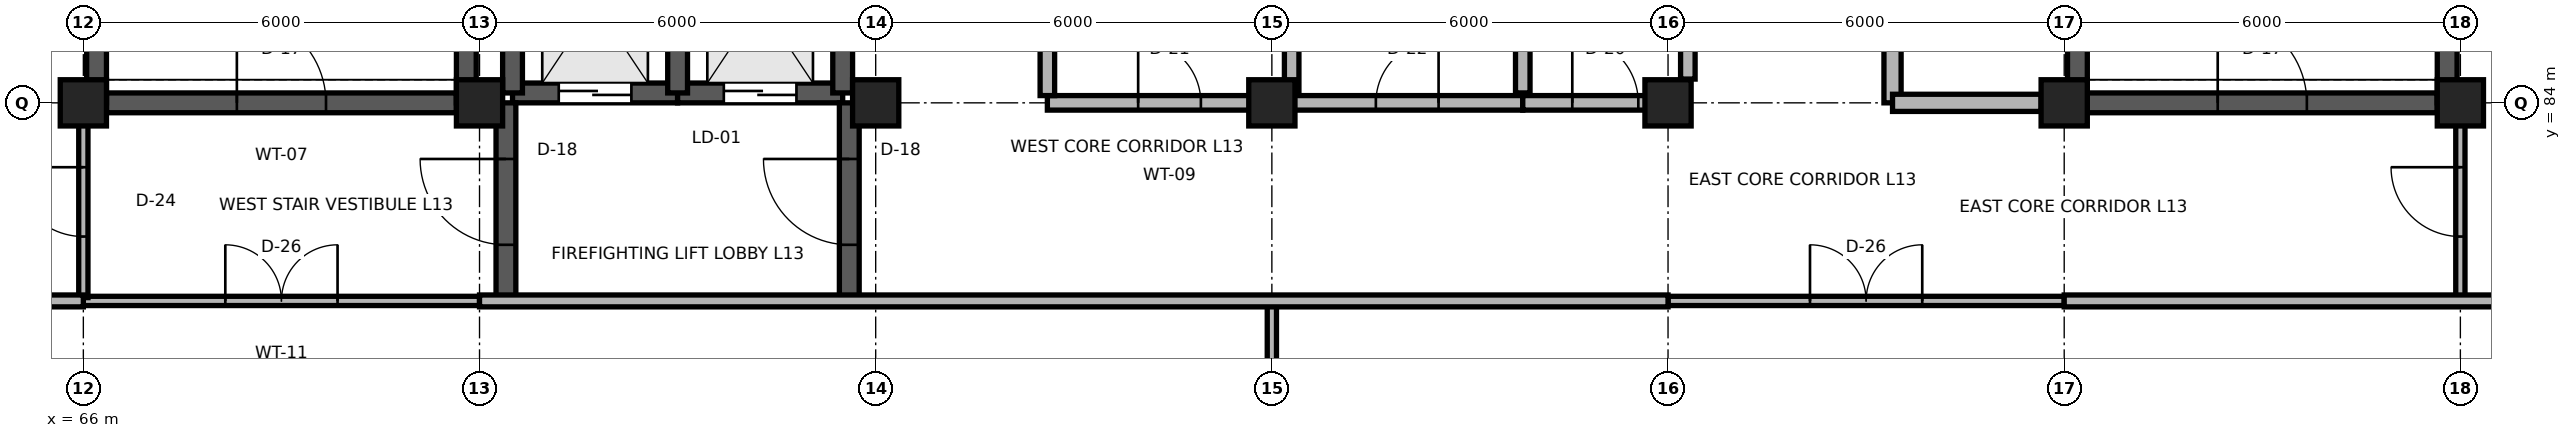
"""IFC4 building model, lengths in metres.
Left out: names, types, materials, properties, quantities, classifications, styles, units other than length and angle.
Written with IfcOpenShell. Run it as: python <this file> out.ifc"""

import sys

from ifc_helpers import new_model, si_unit, direction, frame, frame_2d, origin, origin_2d, place, context, subcontext, project, spatial, rectangle, extrude, element, fill, save


model = new_model("IFC4")
c1 = context("Model", 3, precision=1e-05, world=origin(), true_north=direction((0.0, 1.0)))
c2 = subcontext(c1, "Body", "Model", "MODEL_VIEW")
j1 = project(units=[si_unit("LENGTHUNIT", "METRE"), si_unit("PLANEANGLEUNIT", "RADIAN")], contexts=[c1])
p1 = place(None, origin())
s1 = spatial("IfcSite", under=j1, at=p1, CompositionType="ELEMENT")
p2 = place(p1, origin())
s2 = spatial("IfcBuilding", under=s1, at=p2, CompositionType="ELEMENT")
p3 = place(p2, frame((0.0, 0.0, 52.2)))
s3 = spatial("IfcBuildingStorey", under=s2, at=p3, CompositionType="ELEMENT", Elevation=52.2)
for number, where, z_axis, x_axis in (
    (1, (66.0, 84.0, 0.0), (0.0, 0.0, 1.0), (1.0, 0.0, 0.0)),
    (2, (72.0, 84.0, 0.0), (0.0, 0.0, 1.0), (1.0, 0.0, 0.0)),
    (3, (78.0, 84.0, 0.0), (0.0, 0.0, 1.0), (1.0, 0.0, 0.0)),
    (4, (84.0, 84.0, 0.0), (0.0, 0.0, 1.0), (1.0, 0.0, 0.0)),
    (5, (90.0, 84.0, 0.0), (0.0, 0.0, 1.0), (1.0, 0.0, 0.0)),
    (6, (96.0, 84.0, 0.0), (0.0, 0.0, 1.0), (1.0, 0.0, 0.0)),
    (7, (102.0, 84.0, 0.0), (0.0, 0.0, 1.0), (1.0, 0.0, 0.0)),
):
    element("IfcColumn", number, at=place(p3, frame(where, z_axis=z_axis, x_axis=x_axis)), inside=s3, PredefinedType="COLUMN", context=c2, shape_type="SweptSolid", body=[
        extrude(rectangle(XDim=0.7, YDim=0.7, at=origin_2d()), origin(), (0.0, 0.0, 1.0), 3.9),
    ])
p4 = place(p3, frame((66.35, 84.0, 0.0), z_axis=(0.0, 0.0, 1.0), x_axis=(1.0, 0.0, 0.0)))
e8 = element("IfcWall", 8, at=p4, inside=s3, PredefinedType="SHEAR", context=c2, shape_type="SweptSolid", body=[
    extrude(rectangle(XDim=5.3, YDim=0.3, at=frame_2d((2.65, 0.0))), origin(), (0.0, 0.0, 1.0), 3.66),
])
p5 = place(p4, frame((1.975, 0.0, 0.0)))
e9 = element("IfcOpeningElement", 9, at=p5, cuts=e8, PredefinedType="OPENING", context=c2, shape_type="SweptSolid", body=[
    extrude(rectangle(XDim=1.35, YDim=2.2, at=frame_2d((0.675, 1.1))), frame((0.0, 0.165, 0.0), z_axis=(0.0, -1.0, 0.0), x_axis=(1.0, 0.0, 0.0)), (0.0, 0.0, 1.0), 0.33),
])
for number, where, z_axis, x_axis in (
    (10, (66.2, 84.0, 0.0), (0.0, 0.0, 1.0), (0.0, 1.0, 0.0)),
    (11, (71.8, 84.0, 0.0), (0.0, 0.0, 1.0), (0.0, 1.0, 0.0)),
):
    element("IfcWall", number, at=place(p3, frame(where, z_axis=z_axis, x_axis=x_axis)), inside=s3, PredefinedType="SHEAR", context=c2, shape_type="SweptSolid", body=[
        extrude(rectangle(XDim=11.8, YDim=0.3, at=frame_2d((5.9, 0.0))), origin(), (0.0, 0.0, 1.0), 3.74),
    ])
p6 = place(p3, frame((96.35, 84.0, 0.0), z_axis=(0.0, 0.0, 1.0), x_axis=(1.0, 0.0, 0.0)))
e12 = element("IfcWall", 12, at=p6, inside=s3, PredefinedType="SHEAR", context=c2, shape_type="SweptSolid", body=[
    extrude(rectangle(XDim=5.3, YDim=0.3, at=frame_2d((2.65, 0.0))), origin(), (0.0, 0.0, 1.0), 3.66),
])
p7 = place(p6, frame((1.975, 0.0, 0.0)))
e13 = element("IfcOpeningElement", 13, at=p7, cuts=e12, PredefinedType="OPENING", context=c2, shape_type="SweptSolid", body=[
    extrude(rectangle(XDim=1.35, YDim=2.2, at=frame_2d((0.675, 1.1))), frame((0.0, 0.165, 0.0), z_axis=(0.0, -1.0, 0.0), x_axis=(1.0, 0.0, 0.0)), (0.0, 0.0, 1.0), 0.33),
])
for number, where, z_axis, x_axis in (
    (14, (96.2, 84.0, 0.0), (0.0, 0.0, 1.0), (0.0, 1.0, 0.0)),
    (15, (101.8, 84.0, 0.0), (0.0, 0.0, 1.0), (0.0, 1.0, 0.0)),
):
    element("IfcWall", number, at=place(p3, frame(where, z_axis=z_axis, x_axis=x_axis)), inside=s3, PredefinedType="SHEAR", context=c2, shape_type="SweptSolid", body=[
        extrude(rectangle(XDim=11.8, YDim=0.3, at=frame_2d((5.9, 0.0))), origin(), (0.0, 0.0, 1.0), 3.74),
    ])
p8 = place(p3, frame((72.5, 84.15, 0.0), z_axis=(0.0, 0.0, 1.0), x_axis=(1.0, 0.0, 0.0)))
e16 = element("IfcWall", 16, at=p8, inside=s3, PredefinedType="SHEAR", context=c2, shape_type="SweptSolid", body=[
    extrude(rectangle(XDim=2.5, YDim=0.3, at=frame_2d((1.25, 0.0))), origin(), (0.0, 0.0, 1.0), 3.74),
])
p9 = place(p8, frame((0.7, 0.0, 0.0)))
e17 = element("IfcOpeningElement", 17, at=p9, cuts=e16, PredefinedType="OPENING", context=c2, shape_type="SweptSolid", body=[
    extrude(rectangle(XDim=1.1, YDim=2.1, at=frame_2d((0.55, 1.05))), frame((0.0, 0.165, 0.0), z_axis=(0.0, -1.0, 0.0), x_axis=(1.0, 0.0, 0.0)), (0.0, 0.0, 1.0), 0.33),
])
p10 = place(p3, frame((72.5, 84.15, 0.0), z_axis=(0.0, 0.0, 1.0), x_axis=(0.0, 1.0, 0.0)))
e18 = element("IfcWall", 18, at=p10, inside=s3, PredefinedType="SHEAR", context=c2, shape_type="SweptSolid", body=[
    extrude(rectangle(XDim=3.4, YDim=0.3, at=frame_2d((1.7, 0.0))), origin(), (0.0, 0.0, 1.0), 3.74),
])
p11 = place(p3, frame((75.0, 84.15, 0.0), z_axis=(0.0, 0.0, 1.0), x_axis=(1.0, 0.0, 0.0)))
e19 = element("IfcWall", 19, at=p11, inside=s3, PredefinedType="SHEAR", context=c2, shape_type="SweptSolid", body=[
    extrude(rectangle(XDim=2.5, YDim=0.3, at=frame_2d((1.25, 0.0))), origin(), (0.0, 0.0, 1.0), 3.74),
])
p12 = place(p11, frame((0.7, 0.0, 0.0)))
e20 = element("IfcOpeningElement", 20, at=p12, cuts=e19, PredefinedType="OPENING", context=c2, shape_type="SweptSolid", body=[
    extrude(rectangle(XDim=1.1, YDim=2.1, at=frame_2d((0.55, 1.05))), frame((0.0, 0.165, 0.0), z_axis=(0.0, -1.0, 0.0), x_axis=(1.0, 0.0, 0.0)), (0.0, 0.0, 1.0), 0.33),
])
for number, where, z_axis, x_axis in (
    (21, (75.0, 84.15, 0.0), (0.0, 0.0, 1.0), (0.0, 1.0, 0.0)),
    (22, (77.5, 84.15, 0.0), (0.0, 0.0, 1.0), (0.0, 1.0, 0.0)),
):
    element("IfcWall", number, at=place(p3, frame(where, z_axis=z_axis, x_axis=x_axis)), inside=s3, PredefinedType="SHEAR", context=c2, shape_type="SweptSolid", body=[
        extrude(rectangle(XDim=3.4, YDim=0.3, at=frame_2d((1.7, 0.0))), origin(), (0.0, 0.0, 1.0), 3.74),
    ])
p13 = place(p3, frame((93.4, 84.0, 0.0), z_axis=(0.0, 0.0, 1.0), x_axis=(0.0, 1.0, 0.0)))
e23 = element("IfcWall", 23, at=p13, inside=s3, PredefinedType="PARTITIONING", context=c2, shape_type="SweptSolid", body=[
    extrude(rectangle(XDim=11.96, YDim=0.26, at=frame_2d((5.98, 0.0))), origin(), (0.0, 0.0, 1.0), 3.74),
])
p14 = place(p13, frame((3.425, 0.0, 0.0)))
e24 = element("IfcOpeningElement", 24, at=p14, cuts=e23, PredefinedType="OPENING", context=c2, shape_type="SweptSolid", body=[
    extrude(rectangle(XDim=1.15, YDim=2.2, at=frame_2d((0.575, 1.1))), frame((0.0, 0.145, 0.0), z_axis=(0.0, -1.0, 0.0), x_axis=(1.0, 0.0, 0.0)), (0.0, 0.0, 1.0), 0.29),
])
p15 = place(p3, frame((93.4, 84.0, 0.0), z_axis=(0.0, 0.0, 1.0), x_axis=(1.0, 0.0, 0.0)))
e25 = element("IfcWall", 25, at=p15, inside=s3, PredefinedType="PARTITIONING", context=c2, shape_type="SweptSolid", body=[
    extrude(rectangle(XDim=2.25, YDim=0.26, at=frame_2d((1.125, 0.0))), origin(), (0.0, 0.0, 1.0), 3.449),
])
p16 = place(p3, frame((72.4, 81.0, 0.0), z_axis=(0.0, 0.0, 1.0), x_axis=(0.0, 1.0, 0.0)))
e26 = element("IfcWall", 26, at=p16, inside=s3, PredefinedType="SHEAR", context=c2, shape_type="SweptSolid", body=[
    extrude(rectangle(XDim=3.0, YDim=0.3, at=frame_2d((1.5, 0.0))), origin(), (0.0, 0.0, 1.0), 3.74),
])
p17 = place(p16, frame((0.85, 0.0, 0.0)))
e27 = element("IfcOpeningElement", 27, at=p17, cuts=e26, PredefinedType="OPENING", context=c2, shape_type="SweptSolid", body=[
    extrude(rectangle(XDim=1.3, YDim=2.2, at=frame_2d((0.65, 1.1))), frame((0.0, 0.165, 0.0), z_axis=(0.0, -1.0, 0.0), x_axis=(1.0, 0.0, 0.0)), (0.0, 0.0, 1.0), 0.33),
])
p18 = place(p3, frame((77.6, 81.0, 0.0), z_axis=(0.0, 0.0, 1.0), x_axis=(0.0, 1.0, 0.0)))
e28 = element("IfcWall", 28, at=p18, inside=s3, PredefinedType="SHEAR", context=c2, shape_type="SweptSolid", body=[
    extrude(rectangle(XDim=3.0, YDim=0.3, at=frame_2d((1.5, 0.0))), origin(), (0.0, 0.0, 1.0), 3.74),
])
p19 = place(p18, frame((0.85, 0.0, 0.0)))
e29 = element("IfcOpeningElement", 29, at=p19, cuts=e28, PredefinedType="OPENING", context=c2, shape_type="SweptSolid", body=[
    extrude(rectangle(XDim=1.3, YDim=2.2, at=frame_2d((0.65, 1.1))), frame((0.0, 0.165, 0.0), z_axis=(0.0, -1.0, 0.0), x_axis=(1.0, 0.0, 0.0)), (0.0, 0.0, 1.0), 0.33),
])
p20 = place(p3, frame((80.6, 84.0, 0.0), z_axis=(0.0, 0.0, 1.0), x_axis=(1.0, 0.0, 0.0)))
e30 = element("IfcWall", 30, at=p20, inside=s3, PredefinedType="PARTITIONING", context=c2, shape_type="SweptSolid", body=[
    extrude(rectangle(XDim=3.7, YDim=0.22, at=frame_2d((1.85, 0.0))), origin(), (0.0, 0.0, 1.0), 3.449),
])
p21 = place(p20, frame((1.375, 0.0, 0.0)))
e31 = element("IfcOpeningElement", 31, at=p21, cuts=e30, PredefinedType="OPENING", context=c2, shape_type="SweptSolid", body=[
    extrude(rectangle(XDim=0.95, YDim=2.15, at=frame_2d((0.475, 1.075))), frame((0.0, 0.125, 0.0), z_axis=(0.0, -1.0, 0.0), x_axis=(1.0, 0.0, 0.0)), (0.0, 0.0, 1.0), 0.25),
])
p22 = place(p3, frame((84.3, 84.0, 0.0), z_axis=(0.0, 0.0, 1.0), x_axis=(1.0, 0.0, 0.0)))
e32 = element("IfcWall", 32, at=p22, inside=s3, PredefinedType="PARTITIONING", context=c2, shape_type="SweptSolid", body=[
    extrude(rectangle(XDim=3.5, YDim=0.22, at=frame_2d((1.75, 0.0))), origin(), (0.0, 0.0, 1.0), 3.449),
])
p23 = place(p22, frame((1.275, 0.0, 0.0)))
e33 = element("IfcOpeningElement", 33, at=p23, cuts=e32, PredefinedType="OPENING", context=c2, shape_type="SweptSolid", body=[
    extrude(rectangle(XDim=0.95, YDim=2.1, at=frame_2d((0.475, 1.05))), frame((0.0, 0.125, 0.0), z_axis=(0.0, -1.0, 0.0), x_axis=(1.0, 0.0, 0.0)), (0.0, 0.0, 1.0), 0.25),
])
p24 = place(p3, frame((87.8, 84.0, 0.0), z_axis=(0.0, 0.0, 1.0), x_axis=(1.0, 0.0, 0.0)))
e34 = element("IfcWall", 34, at=p24, inside=s3, PredefinedType="PARTITIONING", context=c2, shape_type="SweptSolid", body=[
    extrude(rectangle(XDim=2.5, YDim=0.22, at=frame_2d((1.25, 0.0))), origin(), (0.0, 0.0, 1.0), 3.449),
])
p25 = place(p24, frame((0.75, 0.0, 0.0)))
e35 = element("IfcOpeningElement", 35, at=p25, cuts=e34, PredefinedType="OPENING", context=c2, shape_type="SweptSolid", body=[
    extrude(rectangle(XDim=1.0, YDim=2.15, at=frame_2d((0.5, 1.075))), frame((0.0, 0.125, 0.0), z_axis=(0.0, -1.0, 0.0), x_axis=(1.0, 0.0, 0.0)), (0.0, 0.0, 1.0), 0.25),
])
for number, where, z_axis, x_axis in (
    (36, (84.3, 84.15, 0.0), (0.0, 0.0, 1.0), (0.0, 1.0, 0.0)),
    (37, (87.8, 84.15, 0.0), (0.0, 0.0, 1.0), (0.0, 1.0, 0.0)),
):
    element("IfcWall", number, at=place(p3, frame(where, z_axis=z_axis, x_axis=x_axis)), inside=s3, PredefinedType="PARTITIONING", context=c2, shape_type="SweptSolid", body=[
        extrude(rectangle(XDim=5.0, YDim=0.22, at=frame_2d((2.5, 0.0))), origin(), (0.0, 0.0, 1.0), 3.74),
    ])
p26 = place(p3, frame((66.0, 81.0, 0.0), z_axis=(0.0, 0.0, 1.0), x_axis=(1.0, 0.0, 0.0)))
e38 = element("IfcWall", 38, at=p26, inside=s3, PredefinedType="PARTITIONING", context=c2, shape_type="SweptSolid", body=[
    extrude(rectangle(XDim=6.0, YDim=0.14, at=frame_2d((3.0, 0.0))), origin(), (0.0, 0.0, 1.0), 3.74),
])
p27 = place(p26, frame((2.15, 0.0, 0.0)))
e39 = element("IfcOpeningElement", 39, at=p27, cuts=e38, PredefinedType="OPENING", context=c2, shape_type="SweptSolid", body=[
    extrude(rectangle(XDim=1.7, YDim=2.45, at=frame_2d((0.85, 1.225))), frame((0.0, 0.085, 0.0), z_axis=(0.0, -1.0, 0.0), x_axis=(1.0, 0.0, 0.0)), (0.0, 0.0, 1.0), 0.17),
])
p28 = place(p3, frame((90.0, 81.0, 0.0), z_axis=(0.0, 0.0, 1.0), x_axis=(1.0, 0.0, 0.0)))
e40 = element("IfcWall", 40, at=p28, inside=s3, PredefinedType="PARTITIONING", context=c2, shape_type="SweptSolid", body=[
    extrude(rectangle(XDim=6.0, YDim=0.14, at=frame_2d((3.0, 0.0))), origin(), (0.0, 0.0, 1.0), 3.74),
])
p29 = place(p28, frame((2.15, 0.0, 0.0)))
e41 = element("IfcOpeningElement", 41, at=p29, cuts=e40, PredefinedType="OPENING", context=c2, shape_type="SweptSolid", body=[
    extrude(rectangle(XDim=1.7, YDim=2.45, at=frame_2d((0.85, 1.225))), frame((0.0, 0.085, 0.0), z_axis=(0.0, -1.0, 0.0), x_axis=(1.0, 0.0, 0.0)), (0.0, 0.0, 1.0), 0.17),
])
p30 = place(p3, frame((66.0, 81.05, 0.0), z_axis=(0.0, 0.0, 1.0), x_axis=(0.0, 1.0, 0.0)))
e42 = element("IfcWall", 42, at=p30, inside=s3, PredefinedType="PARTITIONING", context=c2, shape_type="SweptSolid", body=[
    extrude(rectangle(XDim=2.9, YDim=0.14, at=frame_2d((1.45, 0.0))), origin(), (0.0, 0.0, 1.0), 3.449),
])
p31 = place(p30, frame((0.925, 0.0, 0.0)))
e43 = element("IfcOpeningElement", 43, at=p31, cuts=e42, PredefinedType="OPENING", context=c2, shape_type="SweptSolid", body=[
    extrude(rectangle(XDim=1.05, YDim=2.25, at=frame_2d((0.525, 1.125))), frame((0.0, 0.085, 0.0), z_axis=(0.0, -1.0, 0.0), x_axis=(1.0, 0.0, 0.0)), (0.0, 0.0, 1.0), 0.17),
])
p32 = place(p3, frame((102.0, 81.05, 0.0), z_axis=(0.0, 0.0, 1.0), x_axis=(0.0, 1.0, 0.0)))
e44 = element("IfcWall", 44, at=p32, inside=s3, PredefinedType="PARTITIONING", context=c2, shape_type="SweptSolid", body=[
    extrude(rectangle(XDim=2.9, YDim=0.14, at=frame_2d((1.45, 0.0))), origin(), (0.0, 0.0, 1.0), 3.449),
])
p33 = place(p32, frame((0.925, 0.0, 0.0)))
e45 = element("IfcOpeningElement", 45, at=p33, cuts=e44, PredefinedType="OPENING", context=c2, shape_type="SweptSolid", body=[
    extrude(rectangle(XDim=1.05, YDim=2.25, at=frame_2d((0.525, 1.125))), frame((0.0, 0.085, 0.0), z_axis=(0.0, -1.0, 0.0), x_axis=(1.0, 0.0, 0.0)), (0.0, 0.0, 1.0), 0.17),
])
p34 = place(p3, frame((84.0, 78.35, 0.0), z_axis=(0.0, 0.0, 1.0), x_axis=(0.0, 1.0, 0.0)))
e46 = element("IfcWall", 46, at=p34, inside=s3, PredefinedType="PARTITIONING", context=c2, shape_type="SweptSolid", body=[
    extrude(rectangle(XDim=2.65, YDim=0.14, at=frame_2d((1.325, 0.0))), origin(), (0.0, 0.0, 1.0), 3.449),
])
p35 = place(p3, frame((80.6, 84.11, 0.0), z_axis=(0.0, 0.0, 1.0), x_axis=(0.0, 1.0, 0.0)))
e47 = element("IfcWall", 47, at=p35, inside=s3, PredefinedType="PARTITIONING", context=c2, shape_type="SweptSolid", body=[
    extrude(rectangle(XDim=4.98, YDim=0.22, at=frame_2d((2.49, 0.0))), origin(), (0.0, 0.0, 1.0), 3.74),
])
p36 = place(p3, frame((90.3, 84.36, 0.0), z_axis=(0.0, 0.0, 1.0), x_axis=(0.0, 1.0, 0.0)))
e48 = element("IfcWall", 48, at=p36, inside=s3, PredefinedType="PARTITIONING", context=c2, shape_type="SweptSolid", body=[
    extrude(rectangle(XDim=4.73, YDim=0.22, at=frame_2d((2.365, 0.0))), origin(), (0.0, 0.0, 1.0), 3.74),
])
p37 = place(p3, frame((61.7, 81.0, 0.0), z_axis=(0.0, 0.0, 1.0), x_axis=(1.0, 0.0, 0.0)))
e49 = element("IfcWall", 49, at=p37, inside=s3, PredefinedType="PARTITIONING", context=c2, shape_type="SweptSolid", body=[
    extrude(rectangle(XDim=4.3, YDim=0.18, at=frame_2d((2.15, 0.0))), origin(), (0.0, 0.0, 1.0), 3.74),
])
p38 = place(p3, frame((72.0, 81.0, 0.0), z_axis=(0.0, 0.0, 1.0), x_axis=(1.0, 0.0, 0.0)))
e50 = element("IfcWall", 50, at=p38, inside=s3, PredefinedType="PARTITIONING", context=c2, shape_type="SweptSolid", body=[
    extrude(rectangle(XDim=18.0, YDim=0.18, at=frame_2d((9.0, 0.0))), origin(), (0.0, 0.0, 1.0), 3.74),
])
p39 = place(p3, frame((96.0, 81.0, 0.0), z_axis=(0.0, 0.0, 1.0), x_axis=(1.0, 0.0, 0.0)))
e51 = element("IfcWall", 51, at=p39, inside=s3, PredefinedType="PARTITIONING", context=c2, shape_type="SweptSolid", body=[
    extrude(rectangle(XDim=10.3, YDim=0.18, at=frame_2d((5.15, 0.0))), origin(), (0.0, 0.0, 1.0), 3.74),
])
p40 = place(p5, origin())
e52 = element("IfcDoor", 52, at=p40, inside=s3, OperationType="SINGLE_SWING_LEFT", PredefinedType="DOOR", context=c2, shape_type="SweptSolid", body=[
    extrude(rectangle(XDim=1.35, YDim=2.2, at=frame_2d((0.675, 1.1))), frame((0.0, 0.025, 0.0), z_axis=(0.0, -1.0, 0.0), x_axis=(1.0, 0.0, 0.0)), (0.0, 0.0, 1.0), 0.05),
])
fill(e9, e52)
p41 = place(p7, origin())
e53 = element("IfcDoor", 53, at=p41, inside=s3, OperationType="SINGLE_SWING_LEFT", PredefinedType="DOOR", context=c2, shape_type="SweptSolid", body=[
    extrude(rectangle(XDim=1.35, YDim=2.2, at=frame_2d((0.675, 1.1))), frame((0.0, 0.025, 0.0), z_axis=(0.0, -1.0, 0.0), x_axis=(1.0, 0.0, 0.0)), (0.0, 0.0, 1.0), 0.05),
])
fill(e13, e53)
p42 = place(p9, origin())
e54 = element("IfcDoor", 54, at=p42, inside=s3, OperationType="DOUBLE_DOOR_SLIDING", PredefinedType="DOOR", context=c2, shape_type="SweptSolid", body=[
    extrude(rectangle(XDim=1.1, YDim=2.1, at=frame_2d((0.55, 1.05))), frame((0.0, 0.025, 0.0), z_axis=(0.0, -1.0, 0.0), x_axis=(1.0, 0.0, 0.0)), (0.0, 0.0, 1.0), 0.05),
])
fill(e17, e54)
p43 = place(p12, origin())
e55 = element("IfcDoor", 55, at=p43, inside=s3, OperationType="DOUBLE_DOOR_SLIDING", PredefinedType="DOOR", context=c2, shape_type="SweptSolid", body=[
    extrude(rectangle(XDim=1.1, YDim=2.1, at=frame_2d((0.55, 1.05))), frame((0.0, 0.025, 0.0), z_axis=(0.0, -1.0, 0.0), x_axis=(1.0, 0.0, 0.0)), (0.0, 0.0, 1.0), 0.05),
])
fill(e20, e55)
p44 = place(p17, origin())
e56 = element("IfcDoor", 56, at=p44, inside=s3, OperationType="SINGLE_SWING_RIGHT", PredefinedType="DOOR", context=c2, shape_type="SweptSolid", body=[
    extrude(rectangle(XDim=1.3, YDim=2.2, at=frame_2d((0.65, 1.1))), frame((0.0, 0.025, 0.0), z_axis=(0.0, -1.0, 0.0), x_axis=(1.0, 0.0, 0.0)), (0.0, 0.0, 1.0), 0.05),
])
fill(e27, e56)
p45 = place(p19, origin())
e57 = element("IfcDoor", 57, at=p45, inside=s3, OperationType="SINGLE_SWING_RIGHT", PredefinedType="DOOR", context=c2, shape_type="SweptSolid", body=[
    extrude(rectangle(XDim=1.3, YDim=2.2, at=frame_2d((0.65, 1.1))), frame((0.0, 0.025, 0.0), z_axis=(0.0, -1.0, 0.0), x_axis=(1.0, 0.0, 0.0)), (0.0, 0.0, 1.0), 0.05),
])
fill(e29, e57)
p46 = place(p21, origin())
e58 = element("IfcDoor", 58, at=p46, inside=s3, OperationType="SINGLE_SWING_LEFT", PredefinedType="DOOR", context=c2, shape_type="SweptSolid", body=[
    extrude(rectangle(XDim=0.95, YDim=2.15, at=frame_2d((0.475, 1.075))), frame((0.0, 0.025, 0.0), z_axis=(0.0, -1.0, 0.0), x_axis=(1.0, 0.0, 0.0)), (0.0, 0.0, 1.0), 0.05),
])
fill(e31, e58)
p47 = place(p23, origin())
e59 = element("IfcDoor", 59, at=p47, inside=s3, OperationType="SINGLE_SWING_RIGHT", PredefinedType="DOOR", context=c2, shape_type="SweptSolid", body=[
    extrude(rectangle(XDim=0.95, YDim=2.1, at=frame_2d((0.475, 1.05))), frame((0.0, 0.025, 0.0), z_axis=(0.0, -1.0, 0.0), x_axis=(1.0, 0.0, 0.0)), (0.0, 0.0, 1.0), 0.05),
])
fill(e33, e59)
p48 = place(p25, origin())
e60 = element("IfcDoor", 60, at=p48, inside=s3, OperationType="SINGLE_SWING_LEFT", PredefinedType="DOOR", context=c2, shape_type="SweptSolid", body=[
    extrude(rectangle(XDim=1.0, YDim=2.15, at=frame_2d((0.5, 1.075))), frame((0.0, 0.025, 0.0), z_axis=(0.0, -1.0, 0.0), x_axis=(1.0, 0.0, 0.0)), (0.0, 0.0, 1.0), 0.05),
])
fill(e35, e60)
p49 = place(p27, origin())
e61 = element("IfcDoor", 61, at=p49, inside=s3, OperationType="DOUBLE_DOOR_SINGLE_SWING", PredefinedType="DOOR", context=c2, shape_type="SweptSolid", body=[
    extrude(rectangle(XDim=1.7, YDim=2.45, at=frame_2d((0.85, 1.225))), frame((0.0, 0.025, 0.0), z_axis=(0.0, -1.0, 0.0), x_axis=(1.0, 0.0, 0.0)), (0.0, 0.0, 1.0), 0.05),
])
fill(e39, e61)
p50 = place(p29, origin())
e62 = element("IfcDoor", 62, at=p50, inside=s3, OperationType="DOUBLE_DOOR_SINGLE_SWING", PredefinedType="DOOR", context=c2, shape_type="SweptSolid", body=[
    extrude(rectangle(XDim=1.7, YDim=2.45, at=frame_2d((0.85, 1.225))), frame((0.0, 0.025, 0.0), z_axis=(0.0, -1.0, 0.0), x_axis=(1.0, 0.0, 0.0)), (0.0, 0.0, 1.0), 0.05),
])
fill(e41, e62)
p51 = place(p31, origin())
e63 = element("IfcDoor", 63, at=p51, inside=s3, OperationType="SINGLE_SWING_RIGHT", PredefinedType="DOOR", context=c2, shape_type="SweptSolid", body=[
    extrude(rectangle(XDim=1.05, YDim=2.25, at=frame_2d((0.525, 1.125))), frame((0.0, 0.025, 0.0), z_axis=(0.0, -1.0, 0.0), x_axis=(1.0, 0.0, 0.0)), (0.0, 0.0, 1.0), 0.05),
])
fill(e43, e63)
p52 = place(p33, origin())
e64 = element("IfcDoor", 64, at=p52, inside=s3, OperationType="SINGLE_SWING_RIGHT", PredefinedType="DOOR", context=c2, shape_type="SweptSolid", body=[
    extrude(rectangle(XDim=1.05, YDim=2.25, at=frame_2d((0.525, 1.125))), frame((0.0, 0.025, 0.0), z_axis=(0.0, -1.0, 0.0), x_axis=(1.0, 0.0, 0.0)), (0.0, 0.0, 1.0), 0.05),
])
fill(e45, e64)
save(model, sys.argv[1])
